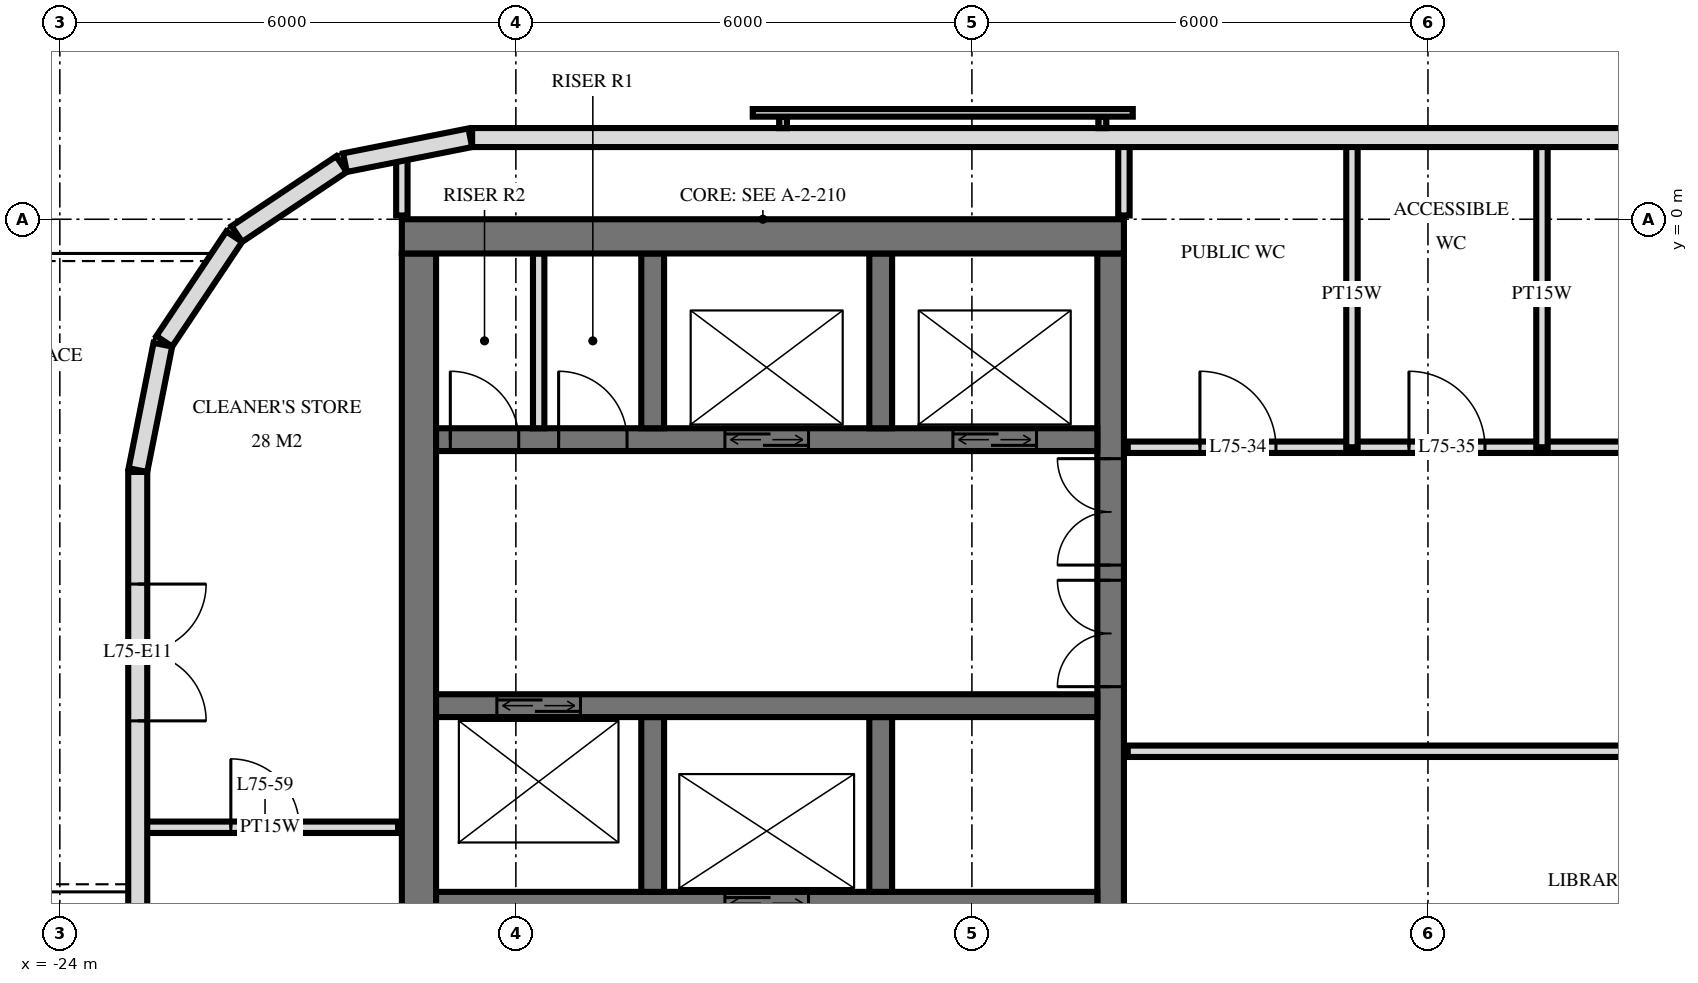
"""IFC4 building model, lengths in metres.
Left out: names, types, materials, properties, quantities, classifications, styles, units other than length and angle.
Written with IfcOpenShell. Run it as: python <this file> out.ifc"""

import sys

from ifc_helpers import new_model, si_unit, direction, frame, frame_2d, origin, place, context, subcontext, project, spatial, rectangle, extrude, element, fill, save


model = new_model("IFC4")
c1 = context("Model", 3, precision=1e-05, world=origin(), true_north=direction((0.0, 1.0)))
c2 = subcontext(c1, "Body", "Model", "MODEL_VIEW")
j1 = project(units=[si_unit("LENGTHUNIT", "METRE"), si_unit("PLANEANGLEUNIT", "RADIAN")], contexts=[c1])
p1 = place(None, origin())
s1 = spatial("IfcSite", under=j1, at=p1, CompositionType="ELEMENT")
p2 = place(p1, origin())
s2 = spatial("IfcBuilding", under=s1, at=p2, CompositionType="ELEMENT")
p3 = place(p2, frame((0.0, 0.0, 284.1)))
s3 = spatial("IfcBuildingStorey", under=s2, at=p3, CompositionType="ELEMENT", Elevation=284.1)
p4 = place(p3, frame((-19.5, -0.225, 0.0), z_axis=(0.0, 0.0, 1.0), x_axis=(1.0, 0.0, 0.0)))
e1 = element("IfcWall", 1, at=p4, inside=s3, PredefinedType="SHEAR", context=c2, shape_type="SweptSolid", body=[
    extrude(rectangle(XDim=9.5, YDim=0.45, at=frame_2d((4.75, 0.0))), origin(), (0.0, 0.0, 1.0), 3.5),
])
p5 = place(p3, frame((-10.175, -14.55, 0.0), z_axis=(0.0, 0.0, 1.0), x_axis=(0.0, 1.0, 0.0)))
e2 = element("IfcWall", 2, at=p5, inside=s3, PredefinedType="SHEAR", context=c2, shape_type="SweptSolid", body=[
    extrude(rectangle(XDim=14.1, YDim=0.35, at=frame_2d((7.05, 0.0))), origin(), (0.0, 0.0, 1.0), 3.5),
])
p6 = place(p5, frame((8.4, 0.0, 0.0)))
e3 = element("IfcOpeningElement", 3, at=p6, cuts=e2, PredefinedType="OPENING", context=c2, shape_type="SweptSolid", body=[
    extrude(rectangle(XDim=1.4, YDim=2.4, at=frame_2d((0.7, 1.2))), frame((0.0, 0.185, 0.0), z_axis=(0.0, -1.0, 0.0), x_axis=(1.0, 0.0, 0.0)), (0.0, 0.0, 1.0), 0.37),
])
p7 = place(p5, frame((10.0, 0.0, 0.0)))
e4 = element("IfcOpeningElement", 4, at=p7, cuts=e2, PredefinedType="OPENING", context=c2, shape_type="SweptSolid", body=[
    extrude(rectangle(XDim=1.4, YDim=2.4, at=frame_2d((0.7, 1.2))), frame((0.0, 0.185, 0.0), z_axis=(0.0, -1.0, 0.0), x_axis=(1.0, 0.0, 0.0)), (0.0, 0.0, 1.0), 0.37),
])
p8 = place(p5, frame((4.0, 0.0, 0.0)))
e5 = element("IfcOpeningElement", 5, at=p8, cuts=e2, PredefinedType="OPENING", context=c2, shape_type="SweptSolid", body=[
    extrude(rectangle(XDim=1.2, YDim=2.1, at=frame_2d((0.6, 1.05))), frame((0.0, 0.185, 0.0), z_axis=(0.0, -1.0, 0.0), x_axis=(1.0, 0.0, 0.0)), (0.0, 0.0, 1.0), 0.37),
])
p9 = place(p3, frame((-19.275, -14.55, 0.0), z_axis=(0.0, 0.0, 1.0), x_axis=(0.0, 1.0, 0.0)))
e6 = element("IfcWall", 6, at=p9, inside=s3, PredefinedType="SHEAR", context=c2, shape_type="SweptSolid", body=[
    extrude(rectangle(XDim=14.1, YDim=0.45, at=frame_2d((7.05, 0.0))), origin(), (0.0, 0.0, 1.0), 3.5),
])
p10 = place(p3, frame((-19.05, -2.9, 0.0), z_axis=(0.0, 0.0, 1.0), x_axis=(1.0, 0.0, 0.0)))
e7 = element("IfcWall", 7, at=p10, inside=s3, PredefinedType="SHEAR", context=c2, shape_type="SweptSolid", body=[
    extrude(rectangle(XDim=8.7, YDim=0.3, at=frame_2d((4.35, 0.0))), origin(), (0.0, 0.0, 1.0), 3.5),
])
p11 = place(p10, frame((6.8, 0.0, 0.0)))
e8 = element("IfcOpeningElement", 8, at=p11, cuts=e7, PredefinedType="OPENING", context=c2, shape_type="SweptSolid", body=[
    extrude(rectangle(XDim=1.1, YDim=2.1, at=frame_2d((0.55, 1.05))), frame((0.0, 0.16, 0.0), z_axis=(0.0, -1.0, 0.0), x_axis=(1.0, 0.0, 0.0)), (0.0, 0.0, 1.0), 0.32),
])
p12 = place(p10, frame((3.8, 0.0, 0.0)))
e9 = element("IfcOpeningElement", 9, at=p12, cuts=e7, PredefinedType="OPENING", context=c2, shape_type="SweptSolid", body=[
    extrude(rectangle(XDim=1.1, YDim=2.1, at=frame_2d((0.55, 1.05))), frame((0.0, 0.16, 0.0), z_axis=(0.0, -1.0, 0.0), x_axis=(1.0, 0.0, 0.0)), (0.0, 0.0, 1.0), 0.32),
])
p13 = place(p10, frame((1.613, 0.0, 0.0)))
e10 = element("IfcOpeningElement", 10, at=p13, cuts=e7, PredefinedType="OPENING", context=c2, shape_type="SweptSolid", body=[
    extrude(rectangle(XDim=0.9, YDim=2.1, at=frame_2d((0.45, 1.05))), frame((0.0, 0.16, 0.0), z_axis=(0.0, -1.0, 0.0), x_axis=(1.0, 0.0, 0.0)), (0.0, 0.0, 1.0), 0.32),
])
p14 = place(p10, frame((0.188, 0.0, 0.0)))
e11 = element("IfcOpeningElement", 11, at=p14, cuts=e7, PredefinedType="OPENING", context=c2, shape_type="SweptSolid", body=[
    extrude(rectangle(XDim=0.9, YDim=2.1, at=frame_2d((0.45, 1.05))), frame((0.0, 0.16, 0.0), z_axis=(0.0, -1.0, 0.0), x_axis=(1.0, 0.0, 0.0)), (0.0, 0.0, 1.0), 0.32),
])
p15 = place(p3, frame((-19.05, -6.4, 0.0), z_axis=(0.0, 0.0, 1.0), x_axis=(1.0, 0.0, 0.0)))
e12 = element("IfcWall", 12, at=p15, inside=s3, PredefinedType="SHEAR", context=c2, shape_type="SweptSolid", body=[
    extrude(rectangle(XDim=8.7, YDim=0.3, at=frame_2d((4.35, 0.0))), origin(), (0.0, 0.0, 1.0), 3.5),
])
p16 = place(p15, frame((0.8, 0.0, 0.0)))
e13 = element("IfcOpeningElement", 13, at=p16, cuts=e12, PredefinedType="OPENING", context=c2, shape_type="SweptSolid", body=[
    extrude(rectangle(XDim=1.1, YDim=2.1, at=frame_2d((0.55, 1.05))), frame((0.0, 0.16, 0.0), z_axis=(0.0, -1.0, 0.0), x_axis=(1.0, 0.0, 0.0)), (0.0, 0.0, 1.0), 0.32),
])
p17 = place(p3, frame((-19.05, -9.0, 0.0), z_axis=(0.0, 0.0, 1.0), x_axis=(1.0, 0.0, 0.0)))
e14 = element("IfcWall", 14, at=p17, inside=s3, PredefinedType="SHEAR", context=c2, shape_type="SweptSolid", body=[
    extrude(rectangle(XDim=8.7, YDim=0.3, at=frame_2d((4.35, 0.0))), origin(), (0.0, 0.0, 1.0), 3.5),
])
p18 = place(p17, frame((3.8, 0.0, 0.0)))
e15 = element("IfcOpeningElement", 15, at=p18, cuts=e14, PredefinedType="OPENING", context=c2, shape_type="SweptSolid", body=[
    extrude(rectangle(XDim=1.1, YDim=2.1, at=frame_2d((0.55, 1.05))), frame((0.0, 0.16, 0.0), z_axis=(0.0, -1.0, 0.0), x_axis=(1.0, 0.0, 0.0)), (0.0, 0.0, 1.0), 0.32),
])
for number, where, z_axis, x_axis in (
    (16, (-13.2, -2.75, 0.0), (0.0, 0.0, 1.0), (0.0, 1.0, 0.0)),
    (17, (-13.2, -8.85, 0.0), (0.0, 0.0, 1.0), (0.0, 1.0, 0.0)),
    (18, (-16.2, -2.75, 0.0), (0.0, 0.0, 1.0), (0.0, 1.0, 0.0)),
    (19, (-16.2, -8.85, 0.0), (0.0, 0.0, 1.0), (0.0, 1.0, 0.0)),
):
    element("IfcWall", number, at=place(p3, frame(where, z_axis=z_axis, x_axis=x_axis)), inside=s3, PredefinedType="SHEAR", context=c2, shape_type="SweptSolid", body=[
        extrude(rectangle(XDim=2.3, YDim=0.3, at=frame_2d((1.15, 0.0))), origin(), (0.0, 0.0, 1.0), 3.5),
    ])
p19 = place(p3, frame((18.575, 1.075, 0.0), z_axis=(0.0, 0.0, 1.0), x_axis=(-1.0, 0.0, 0.0)))
e20 = element("IfcWall", 20, at=p19, inside=s3, PredefinedType="SOLIDWALL", context=c2, shape_type="SweptSolid", body=[
    extrude(rectangle(XDim=37.151, YDim=0.25, at=frame_2d((18.575, 0.0))), origin(), (0.0, 0.0, 1.0), 3.22),
])
p20 = place(p19, frame((9.275, 0.0, 0.9)))
e21 = element("IfcOpeningElement", 21, at=p20, cuts=e20, PredefinedType="OPENING", context=c2, shape_type="SweptSolid", body=[
    extrude(rectangle(XDim=2.4, YDim=1.5, at=frame_2d((1.2, 0.75))), frame((0.0, 0.135, 0.0), z_axis=(0.0, -1.0, 0.0), x_axis=(1.0, 0.0, 0.0)), (0.0, 0.0, 1.0), 0.27),
])
p21 = place(p19, frame((12.275, 0.0, 0.9)))
e22 = element("IfcOpeningElement", 22, at=p21, cuts=e20, PredefinedType="OPENING", context=c2, shape_type="SweptSolid", body=[
    extrude(rectangle(XDim=2.4, YDim=1.5, at=frame_2d((1.2, 0.75))), frame((0.0, 0.135, 0.0), z_axis=(0.0, -1.0, 0.0), x_axis=(1.0, 0.0, 0.0)), (0.0, 0.0, 1.0), 0.27),
])
p22 = place(p19, frame((18.275, 0.0, 0.9)))
e23 = element("IfcOpeningElement", 23, at=p22, cuts=e20, PredefinedType="OPENING", context=c2, shape_type="SweptSolid", body=[
    extrude(rectangle(XDim=2.4, YDim=1.5, at=frame_2d((1.2, 0.75))), frame((0.0, 0.135, 0.0), z_axis=(0.0, -1.0, 0.0), x_axis=(1.0, 0.0, 0.0)), (0.0, 0.0, 1.0), 0.27),
])
p23 = place(p3, frame((-18.6, 1.073, 0.0), z_axis=(0.0, 0.0, 1.0), x_axis=(-0.980797896849, -0.195026884138, 0.0)))
e24 = element("IfcWall", 24, at=p23, inside=s3, PredefinedType="SOLIDWALL", context=c2, shape_type="SweptSolid", body=[
    extrude(rectangle(XDim=1.681, YDim=0.25, at=frame_2d((0.841, 0.0))), origin(), (0.0, 0.0, 1.0), 3.22),
])
for number, where, z_axis, x_axis in (
    (25, (-20.294, 0.726, 0.0), (0.0, 0.0, 1.0), (-0.831, -0.556, 0.0)),
    (26, (-21.706, -0.229, 0.0), (0.0, 0.0, 1.0), (-0.556, -0.831, 0.0)),
):
    element("IfcWall", number, at=place(p3, frame(where, z_axis=z_axis, x_axis=x_axis)), inside=s3, PredefinedType="SOLIDWALL", context=c2, shape_type="SweptSolid", body=[
        extrude(rectangle(XDim=1.656, YDim=0.25, at=frame_2d((0.828, 0.0))), origin(), (0.0, 0.0, 1.0), 3.22),
    ])
p24 = place(p3, frame((-22.645, -1.651, 0.0), z_axis=(0.0, 0.0, 1.0), x_axis=(-0.19513878023, -0.980775640221, 0.0)))
e27 = element("IfcWall", 27, at=p24, inside=s3, PredefinedType="SOLIDWALL", context=c2, shape_type="SweptSolid", body=[
    extrude(rectangle(XDim=1.681, YDim=0.25, at=frame_2d((0.841, 0.0))), origin(), (0.0, 0.0, 1.0), 3.22),
])
p25 = place(p3, frame((-22.975, -3.325, 0.0), z_axis=(0.0, 0.0, 1.0), x_axis=(0.0, -1.0, 0.0)))
e28 = element("IfcWall", 28, at=p25, inside=s3, PredefinedType="SOLIDWALL", context=c2, shape_type="SweptSolid", body=[
    extrude(rectangle(XDim=25.951, YDim=0.25, at=frame_2d((12.975, 0.0))), origin(), (0.0, 0.0, 1.0), 3.22),
])
p26 = place(p25, frame((1.475, 0.0, 0.0)))
e29 = element("IfcOpeningElement", 29, at=p26, cuts=e28, PredefinedType="OPENING", context=c2, shape_type="SweptSolid", body=[
    extrude(rectangle(XDim=1.8, YDim=2.4, at=frame_2d((0.9, 1.2))), frame((0.0, 0.135, 0.0), z_axis=(0.0, -1.0, 0.0), x_axis=(1.0, 0.0, 0.0)), (0.0, 0.0, 1.0), 0.27),
])
p27 = place(p25, frame((7.975, 0.0, 0.0)))
e30 = element("IfcOpeningElement", 30, at=p27, cuts=e28, PredefinedType="OPENING", context=c2, shape_type="SweptSolid", body=[
    extrude(rectangle(XDim=1.8, YDim=2.4, at=frame_2d((0.9, 1.2))), frame((0.0, 0.135, 0.0), z_axis=(0.0, -1.0, 0.0), x_axis=(1.0, 0.0, 0.0)), (0.0, 0.0, 1.0), 0.27),
])
p28 = place(p25, frame((18.175, 0.0, 0.0)))
e31 = element("IfcOpeningElement", 31, at=p28, cuts=e28, PredefinedType="OPENING", context=c2, shape_type="SweptSolid", body=[
    extrude(rectangle(XDim=1.8, YDim=2.4, at=frame_2d((0.9, 1.2))), frame((0.0, 0.135, 0.0), z_axis=(0.0, -1.0, 0.0), x_axis=(1.0, 0.0, 0.0)), (0.0, 0.0, 1.0), 0.27),
])
p29 = place(p25, frame((21.075, 0.0, 0.0)))
e32 = element("IfcOpeningElement", 32, at=p29, cuts=e28, PredefinedType="OPENING", context=c2, shape_type="SweptSolid", body=[
    extrude(rectangle(XDim=1.8, YDim=2.4, at=frame_2d((0.9, 1.2))), frame((0.0, 0.135, 0.0), z_axis=(0.0, -1.0, 0.0), x_axis=(1.0, 0.0, 0.0)), (0.0, 0.0, 1.0), 0.27),
])
p30 = place(p25, frame((23.825, 0.0, 0.9)))
e33 = element("IfcOpeningElement", 33, at=p30, cuts=e28, PredefinedType="OPENING", context=c2, shape_type="SweptSolid", body=[
    extrude(rectangle(XDim=1.8, YDim=1.5, at=frame_2d((0.9, 0.75))), frame((0.0, 0.135, 0.0), z_axis=(0.0, -1.0, 0.0), x_axis=(1.0, 0.0, 0.0)), (0.0, 0.0, 1.0), 0.27),
])
p31 = place(p3, frame((-17.7, -2.75, 0.0), z_axis=(0.0, 0.0, 1.0), x_axis=(0.0, 1.0, 0.0)))
e34 = element("IfcWall", 34, at=p31, inside=s3, PredefinedType="PARTITIONING", context=c2, shape_type="SweptSolid", body=[
    extrude(rectangle(XDim=2.3, YDim=0.15, at=frame_2d((1.15, 0.0))), origin(), (0.0, 0.0, 1.0), 3.2),
])
for number, where, z_axis, x_axis in (
    (35, (-4.5, -3.0, 0.0), (0.0, 0.0, 1.0), (0.0, 1.0, 0.0)),
    (36, (-7.0, -3.0, 0.0), (0.0, 0.0, 1.0), (0.0, 1.0, 0.0)),
):
    element("IfcWall", number, at=place(p3, frame(where, z_axis=z_axis, x_axis=x_axis)), inside=s3, PredefinedType="PLUMBINGWALL", context=c2, shape_type="SweptSolid", body=[
        extrude(rectangle(XDim=4.02, YDim=0.15, at=frame_2d((2.01, 0.0))), origin(), (0.0, 0.0, 1.0), 3.22),
    ])
p32 = place(p3, frame((-10.0, 0.05, 0.0), z_axis=(0.0, 0.0, 1.0), x_axis=(0.0, 1.0, 0.0)))
e37 = element("IfcWall", 37, at=p32, inside=s3, PredefinedType="PLUMBINGWALL", context=c2, shape_type="SweptSolid", body=[
    extrude(rectangle(XDim=0.97, YDim=0.15, at=frame_2d((0.485, 0.0))), origin(), (0.0, 0.0, 1.0), 3.22),
])
p33 = place(p3, frame((-19.5, 0.05, 0.0), z_axis=(0.0, 0.0, 1.0), x_axis=(0.0, 1.0, 0.0)))
e38 = element("IfcWall", 38, at=p33, inside=s3, PredefinedType="PARTITIONING", context=c2, shape_type="SweptSolid", body=[
    extrude(rectangle(XDim=0.787, YDim=0.15, at=frame_2d((0.394, 0.0))), origin(), (0.0, 0.0, 1.0), 3.22),
])
p34 = place(p3, frame((-22.92, -8.0, 0.0), z_axis=(0.0, 0.0, 1.0), x_axis=(1.0, 0.0, 0.0)))
e39 = element("IfcWall", 39, at=p34, inside=s3, PredefinedType="PLUMBINGWALL", context=c2, shape_type="SweptSolid", body=[
    extrude(rectangle(XDim=3.37, YDim=0.15, at=frame_2d((1.685, 0.0))), origin(), (0.0, 0.0, 1.0), 3.22),
])
p35 = place(p34, frame((1.17, 0.0, 0.0)))
e40 = element("IfcOpeningElement", 40, at=p35, cuts=e39, PredefinedType="OPENING", context=c2, shape_type="SweptSolid", body=[
    extrude(rectangle(XDim=0.9, YDim=2.1, at=frame_2d((0.45, 1.05))), frame((0.0, 0.085, 0.0), z_axis=(0.0, -1.0, 0.0), x_axis=(1.0, 0.0, 0.0)), (0.0, 0.0, 1.0), 0.17),
])
p36 = place(p3, frame((-9.95, -7.0, 0.0), z_axis=(0.0, 0.0, 1.0), x_axis=(1.0, 0.0, 0.0)))
e41 = element("IfcWall", 41, at=p36, inside=s3, PredefinedType="PARTITIONING", context=c2, shape_type="SweptSolid", body=[
    extrude(rectangle(XDim=19.9, YDim=0.15, at=frame_2d((9.95, 0.0))), origin(), (0.0, 0.0, 1.0), 3.22),
])
p37 = place(p36, frame((9.45, 0.0, 0.0)))
e42 = element("IfcOpeningElement", 42, at=p37, cuts=e41, PredefinedType="OPENING", context=c2, shape_type="SweptSolid", body=[
    extrude(rectangle(XDim=1.0, YDim=2.1, at=frame_2d((0.5, 1.05))), frame((0.0, 0.085, 0.0), z_axis=(0.0, -1.0, 0.0), x_axis=(1.0, 0.0, 0.0)), (0.0, 0.0, 1.0), 0.17),
])
p38 = place(p36, frame((15.45, 0.0, 0.0)))
e43 = element("IfcOpeningElement", 43, at=p38, cuts=e41, PredefinedType="OPENING", context=c2, shape_type="SweptSolid", body=[
    extrude(rectangle(XDim=1.0, YDim=2.1, at=frame_2d((0.5, 1.05))), frame((0.0, 0.085, 0.0), z_axis=(0.0, -1.0, 0.0), x_axis=(1.0, 0.0, 0.0)), (0.0, 0.0, 1.0), 0.17),
])
p39 = place(p3, frame((-9.95, -3.0, 0.0), z_axis=(0.0, 0.0, 1.0), x_axis=(1.0, 0.0, 0.0)))
e44 = element("IfcWall", 44, at=p39, inside=s3, PredefinedType="PARTITIONING", context=c2, shape_type="SweptSolid", body=[
    extrude(rectangle(XDim=19.9, YDim=0.15, at=frame_2d((9.95, 0.0))), origin(), (0.0, 0.0, 1.0), 3.22),
])
p40 = place(p39, frame((0.95, 0.0, 0.0)))
e45 = element("IfcOpeningElement", 45, at=p40, cuts=e44, PredefinedType="OPENING", context=c2, shape_type="SweptSolid", body=[
    extrude(rectangle(XDim=1.0, YDim=2.1, at=frame_2d((0.5, 1.05))), frame((0.0, 0.085, 0.0), z_axis=(0.0, -1.0, 0.0), x_axis=(1.0, 0.0, 0.0)), (0.0, 0.0, 1.0), 0.17),
])
p41 = place(p39, frame((3.7, 0.0, 0.0)))
e46 = element("IfcOpeningElement", 46, at=p41, cuts=e44, PredefinedType="OPENING", context=c2, shape_type="SweptSolid", body=[
    extrude(rectangle(XDim=1.0, YDim=2.1, at=frame_2d((0.5, 1.05))), frame((0.0, 0.085, 0.0), z_axis=(0.0, -1.0, 0.0), x_axis=(1.0, 0.0, 0.0)), (0.0, 0.0, 1.0), 0.17),
])
p42 = place(p39, frame((7.95, 0.0, 0.0)))
e47 = element("IfcOpeningElement", 47, at=p42, cuts=e44, PredefinedType="OPENING", context=c2, shape_type="SweptSolid", body=[
    extrude(rectangle(XDim=1.0, YDim=2.1, at=frame_2d((0.5, 1.05))), frame((0.0, 0.085, 0.0), z_axis=(0.0, -1.0, 0.0), x_axis=(1.0, 0.0, 0.0)), (0.0, 0.0, 1.0), 0.17),
])
p43 = place(p39, frame((15.2, 0.0, 0.0)))
e48 = element("IfcOpeningElement", 48, at=p43, cuts=e44, PredefinedType="OPENING", context=c2, shape_type="SweptSolid", body=[
    extrude(rectangle(XDim=1.0, YDim=2.1, at=frame_2d((0.5, 1.05))), frame((0.0, 0.085, 0.0), z_axis=(0.0, -1.0, 0.0), x_axis=(1.0, 0.0, 0.0)), (0.0, 0.0, 1.0), 0.17),
])
p44 = place(p26, origin())
e49 = element("IfcDoor", 49, at=p44, inside=s3, OperationType="DOUBLE_DOOR_SINGLE_SWING", PredefinedType="DOOR", context=c2, shape_type="SweptSolid", body=[
    extrude(rectangle(XDim=1.8, YDim=2.4, at=frame_2d((0.9, 1.2))), frame((0.0, 0.025, 0.0), z_axis=(0.0, -1.0, 0.0), x_axis=(1.0, 0.0, 0.0)), (0.0, 0.0, 1.0), 0.05),
])
fill(e29, e49)
p45 = place(p11, origin())
e50 = element("IfcDoor", 50, at=p45, inside=s3, OperationType="DOUBLE_DOOR_SLIDING", PredefinedType="USERDEFINED", context=c2, shape_type="SweptSolid", body=[
    extrude(rectangle(XDim=1.1, YDim=2.1, at=frame_2d((0.55, 1.05))), frame((0.0, 0.025, 0.0), z_axis=(0.0, -1.0, 0.0), x_axis=(1.0, 0.0, 0.0)), (0.0, 0.0, 1.0), 0.05),
])
fill(e8, e50)
p46 = place(p12, origin())
e51 = element("IfcDoor", 51, at=p46, inside=s3, OperationType="DOUBLE_DOOR_SLIDING", PredefinedType="USERDEFINED", context=c2, shape_type="SweptSolid", body=[
    extrude(rectangle(XDim=1.1, YDim=2.1, at=frame_2d((0.55, 1.05))), frame((0.0, 0.025, 0.0), z_axis=(0.0, -1.0, 0.0), x_axis=(1.0, 0.0, 0.0)), (0.0, 0.0, 1.0), 0.05),
])
fill(e9, e51)
p47 = place(p18, origin())
e52 = element("IfcDoor", 52, at=p47, inside=s3, OperationType="DOUBLE_DOOR_SLIDING", PredefinedType="USERDEFINED", context=c2, shape_type="SweptSolid", body=[
    extrude(rectangle(XDim=1.1, YDim=2.1, at=frame_2d((0.55, 1.05))), frame((0.0, 0.025, 0.0), z_axis=(0.0, -1.0, 0.0), x_axis=(1.0, 0.0, 0.0)), (0.0, 0.0, 1.0), 0.05),
])
fill(e15, e52)
p48 = place(p16, origin())
e53 = element("IfcDoor", 53, at=p48, inside=s3, OperationType="DOUBLE_DOOR_SLIDING", PredefinedType="USERDEFINED", context=c2, shape_type="SweptSolid", body=[
    extrude(rectangle(XDim=1.1, YDim=2.1, at=frame_2d((0.55, 1.05))), frame((0.0, 0.025, 0.0), z_axis=(0.0, -1.0, 0.0), x_axis=(1.0, 0.0, 0.0)), (0.0, 0.0, 1.0), 0.05),
])
fill(e13, e53)
p49 = place(p6, origin())
e54 = element("IfcDoor", 54, at=p49, inside=s3, OperationType="DOUBLE_DOOR_SINGLE_SWING", PredefinedType="DOOR", context=c2, shape_type="SweptSolid", body=[
    extrude(rectangle(XDim=1.4, YDim=2.4, at=frame_2d((0.7, 1.2))), frame((0.0, 0.025, 0.0), z_axis=(0.0, -1.0, 0.0), x_axis=(1.0, 0.0, 0.0)), (0.0, 0.0, 1.0), 0.05),
])
fill(e3, e54)
p50 = place(p7, origin())
e55 = element("IfcDoor", 55, at=p50, inside=s3, OperationType="DOUBLE_DOOR_SINGLE_SWING", PredefinedType="DOOR", context=c2, shape_type="SweptSolid", body=[
    extrude(rectangle(XDim=1.4, YDim=2.4, at=frame_2d((0.7, 1.2))), frame((0.0, 0.025, 0.0), z_axis=(0.0, -1.0, 0.0), x_axis=(1.0, 0.0, 0.0)), (0.0, 0.0, 1.0), 0.05),
])
fill(e4, e55)
p51 = place(p13, origin())
e56 = element("IfcDoor", 56, at=p51, inside=s3, OperationType="SINGLE_SWING_RIGHT", PredefinedType="DOOR", context=c2, shape_type="SweptSolid", body=[
    extrude(rectangle(XDim=0.9, YDim=2.1, at=frame_2d((0.45, 1.05))), frame((0.0, 0.025, 0.0), z_axis=(0.0, -1.0, 0.0), x_axis=(1.0, 0.0, 0.0)), (0.0, 0.0, 1.0), 0.05),
])
fill(e10, e56)
p52 = place(p14, origin())
e57 = element("IfcDoor", 57, at=p52, inside=s3, OperationType="SINGLE_SWING_RIGHT", PredefinedType="DOOR", context=c2, shape_type="SweptSolid", body=[
    extrude(rectangle(XDim=0.9, YDim=2.1, at=frame_2d((0.45, 1.05))), frame((0.0, 0.025, 0.0), z_axis=(0.0, -1.0, 0.0), x_axis=(1.0, 0.0, 0.0)), (0.0, 0.0, 1.0), 0.05),
])
fill(e11, e57)
p53 = place(p40, origin())
e58 = element("IfcDoor", 58, at=p53, inside=s3, OperationType="SINGLE_SWING_RIGHT", PredefinedType="DOOR", context=c2, shape_type="SweptSolid", body=[
    extrude(rectangle(XDim=1.0, YDim=2.1, at=frame_2d((0.5, 1.05))), frame((0.0, 0.025, 0.0), z_axis=(0.0, -1.0, 0.0), x_axis=(1.0, 0.0, 0.0)), (0.0, 0.0, 1.0), 0.05),
])
fill(e45, e58)
p54 = place(p41, origin())
e59 = element("IfcDoor", 59, at=p54, inside=s3, OperationType="SINGLE_SWING_RIGHT", PredefinedType="DOOR", context=c2, shape_type="SweptSolid", body=[
    extrude(rectangle(XDim=1.0, YDim=2.1, at=frame_2d((0.5, 1.05))), frame((0.0, 0.025, 0.0), z_axis=(0.0, -1.0, 0.0), x_axis=(1.0, 0.0, 0.0)), (0.0, 0.0, 1.0), 0.05),
])
fill(e46, e59)
p55 = place(p35, origin())
e60 = element("IfcDoor", 60, at=p55, inside=s3, OperationType="SINGLE_SWING_RIGHT", PredefinedType="DOOR", context=c2, shape_type="SweptSolid", body=[
    extrude(rectangle(XDim=0.9, YDim=2.1, at=frame_2d((0.45, 1.05))), frame((0.0, 0.025, 0.0), z_axis=(0.0, -1.0, 0.0), x_axis=(1.0, 0.0, 0.0)), (0.0, 0.0, 1.0), 0.05),
])
fill(e40, e60)
save(model, sys.argv[1])
